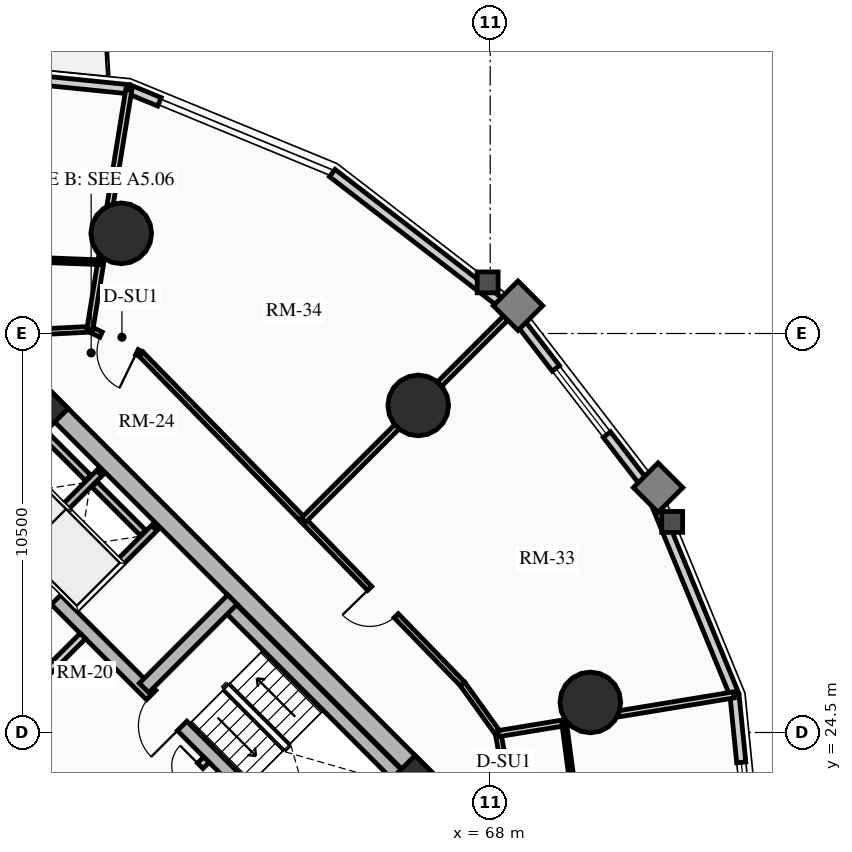
"""IFC4 building model, lengths in metres.
Left out: names, types, materials, properties, quantities, classifications, styles, units other than length and angle.
Written with IfcOpenShell. Run it as: python <this file> out.ifc"""

import sys

from ifc_helpers import new_model, si_unit, direction, frame, frame_2d, origin, origin_2d, place, context, subcontext, project, spatial, rectangle, circle, extrude, source, transform, mapped, element, fill, save


model = new_model("IFC4")
c1 = context("Model", 3, precision=1e-05, world=origin(), true_north=direction((0.0, 1.0)))
c2 = subcontext(c1, "Body", "Model", "MODEL_VIEW")
j1 = project(units=[si_unit("LENGTHUNIT", "METRE"), si_unit("PLANEANGLEUNIT", "RADIAN")], contexts=[c1])
p1 = place(None, origin())
s1 = spatial("IfcSite", under=j1, at=p1, CompositionType="ELEMENT")
p2 = place(p1, origin())
s2 = spatial("IfcBuilding", under=s1, at=p2, CompositionType="ELEMENT")
p3 = place(p2, frame((0.0, 0.0, 56.92)))
s3 = spatial("IfcBuildingStorey", under=s2, at=p3, CompositionType="ELEMENT", Elevation=56.92)
for number, where, z_axis, x_axis in (
    (1, (58.773, 15.661, 0.0), (0.0, 0.0, 1.0), (-0.707, 0.707, 0.0)),
    (2, (66.339, 23.227, 0.0), (0.0, 0.0, 1.0), (-0.707, 0.707, 0.0)),
):
    element("IfcWall", number, at=place(p3, frame(where, z_axis=z_axis, x_axis=x_axis)), inside=s3, PredefinedType="SHEAR", context=c2, shape_type="SweptSolid", body=[
        extrude(rectangle(XDim=14.3, YDim=0.5, at=frame_2d((7.15, 0.0))), origin(), (0.0, 0.0, 1.0), 2.91),
    ])
p4 = place(p3, frame((58.596, 15.838, 0.0), z_axis=(0.0, 0.0, 1.0), x_axis=(0.707106781187, 0.707106781187, 0.0)))
e3 = element("IfcWall", 3, at=p4, inside=s3, PredefinedType="SHEAR", context=c2, shape_type="SweptSolid", body=[
    extrude(rectangle(XDim=10.7, YDim=0.5, at=frame_2d((5.35, 0.0))), origin(), (0.0, 0.0, 1.0), 2.91),
])
m1 = source(origin(), c2, "Body", "SweptSolid", [
    extrude(rectangle(XDim=1.5, YDim=2.02, at=frame_2d((0.75, 1.01))), frame((0.0, 0.26, 0.0), z_axis=(0.0, -1.0, 0.0), x_axis=(1.0, 0.0, 0.0)), (0.0, 0.0, 1.0), 0.52),
])
p5 = place(p4, frame((5.45, 0.0, 0.0)))
e4 = element("IfcOpeningElement", 4, at=p5, cuts=e3, PredefinedType="OPENING", context=c2, shape_type="MappedRepresentation", body=[
    mapped(m1, transform((0.0, 0.0, 0.0), x_axis=(1.0, 0.0, 0.0), y_axis=(0.0, 1.0, 0.0), z_axis=(0.0, 0.0, 1.0), scale=1.0)),
])
p6 = place(p3, frame((48.838, 25.596, 0.0), z_axis=(0.0, 0.0, 1.0), x_axis=(0.707106781187, 0.707106781187, 0.0)))
e5 = element("IfcWall", 5, at=p6, inside=s3, PredefinedType="SHEAR", context=c2, shape_type="SweptSolid", body=[
    extrude(rectangle(XDim=10.7, YDim=0.5, at=frame_2d((5.35, 0.0))), origin(), (0.0, 0.0, 1.0), 2.91),
])
p7 = place(p6, frame((4.6, 0.0, 0.0)))
e6 = element("IfcOpeningElement", 6, at=p7, cuts=e5, PredefinedType="OPENING", context=c2, shape_type="MappedRepresentation", body=[
    mapped(m1, transform((0.0, 0.0, 0.0), x_axis=(1.0, 0.0, 0.0), y_axis=(0.0, 1.0, 0.0), z_axis=(0.0, 0.0, 1.0), scale=1.0)),
])
p8 = place(p3, frame((61.096, 18.338, 0.0), z_axis=(0.0, 0.0, 1.0), x_axis=(-0.707106781187, 0.707106781187, 0.0)))
e7 = element("IfcWall", 7, at=p8, inside=s3, PredefinedType="SHEAR", context=c2, shape_type="SweptSolid", body=[
    extrude(rectangle(XDim=13.8, YDim=0.35, at=frame_2d((6.9, 0.0))), origin(), (0.0, 0.0, 1.0), 2.91),
])
m2 = source(origin(), c2, "Body", "SweptSolid", [
    extrude(rectangle(XDim=1.1, YDim=2.015, at=frame_2d((0.55, 1.007))), frame((0.0, 0.185, 0.0), z_axis=(0.0, -1.0, 0.0), x_axis=(1.0, 0.0, 0.0)), (0.0, 0.0, 1.0), 0.37),
])
p9 = place(p8, frame((4.9, 0.0, 0.0)))
e8 = element("IfcOpeningElement", 8, at=p9, cuts=e7, PredefinedType="OPENING", context=c2, shape_type="MappedRepresentation", body=[
    mapped(m2, transform((0.0, 0.0, 0.0), x_axis=(1.0, 0.0, 0.0), y_axis=(0.0, 1.0, 0.0), z_axis=(0.0, 0.0, 1.0), scale=1.0)),
])
m3 = source(origin(), c2, "Body", "SweptSolid", [
    extrude(rectangle(XDim=1.15, YDim=2.02, at=frame_2d((0.575, 1.01))), frame((0.0, 0.185, 0.0), z_axis=(0.0, -1.0, 0.0), x_axis=(1.0, 0.0, 0.0)), (0.0, 0.0, 1.0), 0.37),
])
p10 = place(p8, frame((7.32, 0.0, 0.0)))
e9 = element("IfcOpeningElement", 9, at=p10, cuts=e7, PredefinedType="OPENING", context=c2, shape_type="MappedRepresentation", body=[
    mapped(m3, transform((0.0, 0.0, 0.0), x_axis=(1.0, 0.0, 0.0), y_axis=(0.0, 1.0, 0.0), z_axis=(0.0, 0.0, 1.0), scale=1.0)),
])
p11 = place(p3, frame((63.662, 20.904, 0.0), z_axis=(0.0, 0.0, 1.0), x_axis=(-0.707106781187, 0.707106781187, 0.0)))
e10 = element("IfcWall", 10, at=p11, inside=s3, PredefinedType="SHEAR", context=c2, shape_type="SweptSolid", body=[
    extrude(rectangle(XDim=13.8, YDim=0.35, at=frame_2d((6.9, 0.0))), origin(), (0.0, 0.0, 1.0), 2.91),
])
p12 = place(p11, frame((10.025, 0.0, 0.0)))
e11 = element("IfcOpeningElement", 11, at=p12, cuts=e10, PredefinedType="OPENING", context=c2, shape_type="MappedRepresentation", body=[
    mapped(m2, transform((0.0, 0.0, 0.0), x_axis=(1.0, 0.0, 0.0), y_axis=(0.0, 1.0, 0.0), z_axis=(0.0, 0.0, 1.0), scale=1.0)),
])
p13 = place(p11, frame((12.025, 0.0, 0.0)))
e12 = element("IfcOpeningElement", 12, at=p13, cuts=e10, PredefinedType="OPENING", context=c2, shape_type="MappedRepresentation", body=[
    mapped(m2, transform((0.0, 0.0, 0.0), x_axis=(1.0, 0.0, 0.0), y_axis=(0.0, 1.0, 0.0), z_axis=(0.0, 0.0, 1.0), scale=1.0)),
])
p14 = place(p11, frame((5.33, 0.0, 0.0)))
e13 = element("IfcOpeningElement", 13, at=p14, cuts=e10, PredefinedType="OPENING", context=c2, shape_type="MappedRepresentation", body=[
    mapped(m3, transform((0.0, 0.0, 0.0), x_axis=(1.0, 0.0, 0.0), y_axis=(0.0, 1.0, 0.0), z_axis=(0.0, 0.0, 1.0), scale=1.0)),
])
p15 = place(p3, frame((65.847, 23.089, 0.0), z_axis=(0.0, 0.0, 1.0), x_axis=(-0.707106781187, 0.707106781187, 0.0)))
e14 = element("IfcWall", 14, at=p15, inside=s3, PredefinedType="SHEAR", context=c2, shape_type="SweptSolid", body=[
    extrude(rectangle(XDim=6.745, YDim=0.35, at=frame_2d((3.373, 0.0))), origin(), (0.0, 0.0, 1.0), 2.91),
])
p16 = place(p3, frame((58.893, 25.674, 0.0), z_axis=(0.0, 0.0, 1.0), x_axis=(0.707106781187, 0.707106781187, 0.0)))
e15 = element("IfcWall", 15, at=p16, inside=s3, PredefinedType="SHEAR", context=c2, shape_type="SweptSolid", body=[
    extrude(rectangle(XDim=3.285, YDim=0.35, at=frame_2d((1.643, 0.0))), origin(), (0.0, 0.0, 1.0), 2.91),
])
for number, where, z_axis, x_axis in (
    (16, (66.024, 23.294, 0.0), (0.0, 0.0, 1.0), (0.707, 0.707, 0.0)),
    (17, (56.294, 33.024, 0.0), (0.0, 0.0, 1.0), (0.707, 0.707, 0.0)),
):
    element("IfcColumn", number, at=place(p3, frame(where, z_axis=z_axis, x_axis=x_axis)), inside=s3, PredefinedType="COLUMN", context=c2, shape_type="SweptSolid", body=[
        extrude(rectangle(XDim=0.85, YDim=0.85, at=origin_2d()), origin(), (0.0, 0.0, 1.0), 2.91),
    ])
for number, where, z_axis, x_axis in (
    (18, (66.107, 33.107, 0.0), (0.0, 0.0, 1.0), (1.0, 0.0, 0.0)),
    (19, (58.291, 37.635, 0.0), (0.0, 0.0, 1.0), (1.0, 0.0, 0.0)),
    (20, (70.635, 25.291, 0.0), (0.0, 0.0, 1.0), (1.0, 0.0, 0.0)),
):
    element("IfcColumn", number, at=place(p3, frame(where, z_axis=z_axis, x_axis=x_axis)), inside=s3, PredefinedType="USERDEFINED", context=c2, shape_type="SweptSolid", body=[
        extrude(circle(Radius=0.8, at=origin_2d()), origin(), (0.0, 0.0, 1.0), 2.91),
    ])
p17 = place(p3, frame((63.844, 39.222, 0.0), z_axis=(0.0, 0.0, 1.0), x_axis=(0.792014314407, -0.610502519057, 0.0)))
e21 = element("IfcWall", 21, at=p17, inside=s3, PredefinedType="SOLIDWALL", context=c2, shape_type="SweptSolid", body=[
    extrude(rectangle(XDim=5.973, YDim=0.24, at=frame_2d((2.987, 0.0))), origin(), (0.0, 0.0, 1.0), 2.073),
])
p18 = place(p3, frame((58.493, 41.428, 0.0), z_axis=(0.0, 0.0, 1.0), x_axis=(0.924556017656, -0.381046152345, 0.0)))
e22 = element("IfcWall", 22, at=p18, inside=s3, PredefinedType="SOLIDWALL", context=c2, shape_type="SweptSolid", body=[
    extrude(rectangle(XDim=0.87, YDim=0.24, at=frame_2d((0.435, 0.0))), origin(), (0.0, 0.0, 1.0), 2.073),
])
p19 = place(p3, frame((53.043, 41.976, 0.0), z_axis=(0.0, 0.0, 1.0), x_axis=(0.994970765694, -0.100165739718, 0.0)))
e23 = element("IfcWall", 23, at=p19, inside=s3, PredefinedType="SOLIDWALL", context=c2, shape_type="SweptSolid", body=[
    extrude(rectangle(XDim=5.477, YDim=0.24, at=frame_2d((2.738, 0.0))), origin(), (0.0, 0.0, 1.0), 2.073),
])
m4 = source(origin(), c2, "Body", "SweptSolid", [
    extrude(rectangle(XDim=1.15, YDim=2.005, at=frame_2d((0.575, 1.002))), frame((0.0, 0.13, 0.0), z_axis=(0.0, -1.0, 0.0), x_axis=(1.0, 0.0, 0.0)), (0.0, 0.0, 1.0), 0.26),
])
p20 = place(p19, frame((2.163, 0.0, 0.0)))
e24 = element("IfcOpeningElement", 24, at=p20, cuts=e23, PredefinedType="OPENING", context=c2, shape_type="MappedRepresentation", body=[
    mapped(m4, transform((0.0, 0.0, 0.0), x_axis=(1.0, 0.0, 0.0), y_axis=(0.0, 1.0, 0.0), z_axis=(0.0, 0.0, 1.0), scale=1.0)),
])
p21 = place(p3, frame((74.428, 25.493, 0.0), z_axis=(0.0, 0.0, 1.0), x_axis=(0.100165739718, -0.994970765694, 0.0)))
e25 = element("IfcWall", 25, at=p21, inside=s3, PredefinedType="SOLIDWALL", context=c2, shape_type="SweptSolid", body=[
    extrude(rectangle(XDim=5.477, YDim=0.24, at=frame_2d((2.738, 0.0))), origin(), (0.0, 0.0, 1.0), 2.073),
])
m5 = source(origin(), c2, "Body", "SweptSolid", [
    extrude(rectangle(XDim=1.9, YDim=1.35, at=frame_2d((0.95, 0.675))), frame((0.0, 0.13, 0.0), z_axis=(0.0, -1.0, 0.0), x_axis=(1.0, 0.0, 0.0)), (0.0, 0.0, 1.0), 0.26),
])
p22 = place(p21, frame((1.788, 0.0, 0.65)))
e26 = element("IfcOpeningElement", 26, at=p22, cuts=e25, PredefinedType="OPENING", context=c2, shape_type="MappedRepresentation", body=[
    mapped(m5, transform((0.0, 0.0, 0.0), x_axis=(1.0, 0.0, 0.0), y_axis=(0.0, 1.0, 0.0), z_axis=(0.0, 0.0, 1.0), scale=1.0)),
])
p23 = place(p3, frame((72.222, 30.844, 0.0), z_axis=(0.0, 0.0, 1.0), x_axis=(0.381027682565, -0.924563629567, 0.0)))
e27 = element("IfcWall", 27, at=p23, inside=s3, PredefinedType="SOLIDWALL", context=c2, shape_type="SweptSolid", body=[
    extrude(rectangle(XDim=5.789, YDim=0.24, at=frame_2d((2.894, 0.0))), origin(), (0.0, 0.0, 1.0), 2.073),
])
p24 = place(p3, frame((68.575, 35.575, 0.0), z_axis=(0.0, 0.0, 1.0), x_axis=(0.610502519057, -0.792014314407, 0.0)))
e28 = element("IfcWall", 28, at=p24, inside=s3, PredefinedType="SOLIDWALL", context=c2, shape_type="SweptSolid", body=[
    extrude(rectangle(XDim=5.973, YDim=0.24, at=frame_2d((2.987, 0.0))), origin(), (0.0, 0.0, 1.0), 2.073),
])
m6 = source(origin(), c2, "Body", "SweptSolid", [
    extrude(rectangle(XDim=2.2, YDim=1.35, at=frame_2d((1.1, 0.675))), frame((0.0, 0.13, 0.0), z_axis=(0.0, -1.0, 0.0), x_axis=(1.0, 0.0, 0.0)), (0.0, 0.0, 1.0), 0.26),
])
p25 = place(p24, frame((1.887, 0.0, 0.65)))
e29 = element("IfcOpeningElement", 29, at=p25, cuts=e28, PredefinedType="OPENING", context=c2, shape_type="MappedRepresentation", body=[
    mapped(m6, transform((0.0, 0.0, 0.0), x_axis=(1.0, 0.0, 0.0), y_axis=(0.0, 1.0, 0.0), z_axis=(0.0, 0.0, 1.0), scale=1.0)),
])
p26 = place(p3, frame((57.062, 27.781, 0.0), z_axis=(0.0, 0.0, 1.0), x_axis=(0.707106781187, 0.707106781187, 0.0)))
e30 = element("IfcWall", 30, at=p26, inside=s3, PredefinedType="SHEAR", context=c2, shape_type="SweptSolid", body=[
    extrude(rectangle(XDim=2.97, YDim=0.2, at=frame_2d((1.485, 0.0))), origin(), (0.0, 0.0, 1.0), 2.91),
])
p27 = place(p3, frame((55.615, 29.227, 0.0), z_axis=(0.0, 0.0, 1.0), x_axis=(0.707147878904, 0.70706568108, 0.0)))
e31 = element("IfcWall", 31, at=p27, inside=s3, PredefinedType="SHEAR", context=c2, shape_type="SweptSolid", body=[
    extrude(rectangle(XDim=2.97, YDim=0.2, at=frame_2d((1.485, 0.0))), origin(), (0.0, 0.0, 1.0), 2.91),
])
p28 = place(p3, frame((58.865, 29.754, 0.0), z_axis=(0.0, 0.0, 1.0), x_axis=(-0.707174411312, 0.707039144592, 0.0)))
e32 = element("IfcWall", 32, at=p28, inside=s3, PredefinedType="SHEAR", context=c2, shape_type="SweptSolid", body=[
    extrude(rectangle(XDim=1.805, YDim=0.2, at=frame_2d((0.902, 0.0))), origin(), (0.0, 0.0, 1.0), 2.91),
])
p29 = place(p3, frame((57.419, 31.2, 0.0), z_axis=(0.0, 0.0, 1.0), x_axis=(-0.707032117043, 0.707181437447, 0.0)))
e33 = element("IfcWall", 33, at=p29, inside=s3, PredefinedType="SHEAR", context=c2, shape_type="SweptSolid", body=[
    extrude(rectangle(XDim=1.635, YDim=0.2, at=frame_2d((0.817, 0.0))), origin(), (0.0, 0.0, 1.0), 2.91),
])
p30 = place(p3, frame((58.214, 21.467, 0.0), z_axis=(0.0, 0.0, 1.0), x_axis=(0.707106781187, 0.707106781187, 0.0)))
e34 = element("IfcWall", 34, at=p30, inside=s3, PredefinedType="PARTITIONING", context=c2, shape_type="SweptSolid", body=[
    extrude(rectangle(XDim=3.28, YDim=0.2, at=frame_2d((1.64, 0.0))), origin(), (0.0, 0.0, 1.0), 2.635),
])
m7 = source(origin(), c2, "Body", "SweptSolid", [
    extrude(rectangle(XDim=1.5, YDim=2.02, at=frame_2d((0.75, 1.01))), frame((0.0, 0.11, 0.0), z_axis=(0.0, -1.0, 0.0), x_axis=(1.0, 0.0, 0.0)), (0.0, 0.0, 1.0), 0.22),
])
p31 = place(p30, frame((1.55, 0.0, 0.0)))
e35 = element("IfcOpeningElement", 35, at=p31, cuts=e34, PredefinedType="OPENING", context=c2, shape_type="MappedRepresentation", body=[
    mapped(m7, transform((0.0, 0.0, 0.0), x_axis=(1.0, 0.0, 0.0), y_axis=(0.0, 1.0, 0.0), z_axis=(0.0, 0.0, 1.0), scale=1.0)),
])
p32 = place(p3, frame((54.961, 24.719, 0.0), z_axis=(0.0, 0.0, 1.0), x_axis=(0.707106781187, 0.707106781187, 0.0)))
e36 = element("IfcWall", 36, at=p32, inside=s3, PredefinedType="PARTITIONING", context=c2, shape_type="SweptSolid", body=[
    extrude(rectangle(XDim=3.28, YDim=0.2, at=frame_2d((1.64, 0.0))), origin(), (0.0, 0.0, 1.0), 2.635),
])
m8 = source(origin(), c2, "Body", "SweptSolid", [
    extrude(rectangle(XDim=0.9, YDim=2.005, at=frame_2d((0.45, 1.002))), frame((0.0, 0.11, 0.0), z_axis=(0.0, -1.0, 0.0), x_axis=(1.0, 0.0, 0.0)), (0.0, 0.0, 1.0), 0.22),
])
p33 = place(p32, frame((0.16, 0.0, 0.0)))
e37 = element("IfcOpeningElement", 37, at=p33, cuts=e36, PredefinedType="OPENING", context=c2, shape_type="MappedRepresentation", body=[
    mapped(m8, transform((0.0, 0.0, 0.0), x_axis=(1.0, 0.0, 0.0), y_axis=(0.0, 1.0, 0.0), z_axis=(0.0, 0.0, 1.0), scale=1.0)),
])
p34 = place(p3, frame((63.086, 30.086, 0.0), z_axis=(0.0, 0.0, 1.0), x_axis=(-0.699075897379, 0.715047473741, 0.0)))
e38 = element("IfcWall", 38, at=p34, inside=s3, PredefinedType="PARTITIONING", context=c2, shape_type="SweptSolid", body=[
    extrude(rectangle(XDim=6.114, YDim=0.15, at=frame_2d((3.057, 0.0))), origin(), (0.0, 0.0, 1.0), 2.159),
])
p35 = place(p3, frame((58.812, 34.458, 0.0), z_axis=(0.0, 0.0, 1.0), x_axis=(-0.899559490277, 0.436798264021, 0.0)))
e39 = element("IfcWall", 39, at=p35, inside=s3, PredefinedType="PARTITIONING", context=c2, shape_type="SweptSolid", body=[
    extrude(rectangle(XDim=1.495, YDim=0.15, at=frame_2d((0.748, 0.0))), origin(), (0.0, 0.0, 1.0), 2.205),
])
m9 = source(origin(), c2, "Body", "SweptSolid", [
    extrude(rectangle(XDim=1.05, YDim=2.015, at=frame_2d((0.525, 1.007))), frame((0.0, 0.085, 0.0), z_axis=(0.0, -1.0, 0.0), x_axis=(1.0, 0.0, 0.0)), (0.0, 0.0, 1.0), 0.17),
])
p36 = place(p35, frame((0.12, 0.0, 0.0)))
e40 = element("IfcOpeningElement", 40, at=p36, cuts=e39, PredefinedType="OPENING", context=c2, shape_type="MappedRepresentation", body=[
    mapped(m9, transform((0.0, 0.0, 0.0), x_axis=(1.0, 0.0, 0.0), y_axis=(0.0, 1.0, 0.0), z_axis=(0.0, 0.0, 1.0), scale=1.0)),
])
p37 = place(p3, frame((57.467, 35.111, 0.0), z_axis=(0.0, 0.0, 1.0), x_axis=(-0.998691757323, -0.051134859488, 0.0)))
e41 = element("IfcWall", 41, at=p37, inside=s3, PredefinedType="PARTITIONING", context=c2, shape_type="SweptSolid", body=[
    extrude(rectangle(XDim=1.485, YDim=0.15, at=frame_2d((0.742, 0.0))), origin(), (0.0, 0.0, 1.0), 2.159),
])
p38 = place(p3, frame((68.456, 23.11, 0.0), z_axis=(0.0, 0.0, 1.0), x_axis=(-0.1772522795, 0.984165448191, 0.0)))
e42 = element("IfcWall", 42, at=p38, inside=s3, PredefinedType="PARTITIONING", context=c2, shape_type="SweptSolid", body=[
    extrude(rectangle(XDim=1.382, YDim=0.15, at=frame_2d((0.691, 0.0))), origin(), (0.0, 0.0, 1.0), 2.159),
])
p39 = place(p3, frame((68.211, 24.469, 0.0), z_axis=(0.0, 0.0, 1.0), x_axis=(-0.583012141368, 0.812463441034, 0.0)))
e43 = element("IfcWall", 43, at=p39, inside=s3, PredefinedType="PARTITIONING", context=c2, shape_type="SweptSolid", body=[
    extrude(rectangle(XDim=1.613, YDim=0.15, at=frame_2d((0.807, 0.0))), origin(), (0.0, 0.0, 1.0), 2.205),
])
p40 = place(p3, frame((67.27, 25.78, 0.0), z_axis=(0.0, 0.0, 1.0), x_axis=(-0.696847842907, 0.717218992942, 0.0)))
e44 = element("IfcWall", 44, at=p40, inside=s3, PredefinedType="PARTITIONING", context=c2, shape_type="SweptSolid", body=[
    extrude(rectangle(XDim=6.004, YDim=0.15, at=frame_2d((3.002, 0.0))), origin(), (0.0, 0.0, 1.0), 2.635),
])
m10 = source(origin(), c2, "Body", "SweptSolid", [
    extrude(rectangle(XDim=1.0, YDim=2.015, at=frame_2d((0.5, 1.007))), frame((0.0, 0.085, 0.0), z_axis=(0.0, -1.0, 0.0), x_axis=(1.0, 0.0, 0.0)), (0.0, 0.0, 1.0), 0.17),
])
p41 = place(p40, frame((2.502, 0.0, 0.0)))
e45 = element("IfcOpeningElement", 45, at=p41, cuts=e44, PredefinedType="OPENING", context=c2, shape_type="MappedRepresentation", body=[
    mapped(m10, transform((0.0, 0.0, 0.0), x_axis=(1.0, 0.0, 0.0), y_axis=(0.0, 1.0, 0.0), z_axis=(0.0, 0.0, 1.0), scale=1.0)),
])
p42 = place(p3, frame((63.086, 30.086, 0.0), z_axis=(0.0, 0.0, 1.0), x_axis=(0.707106781187, 0.707106781187, 0.0)))
e46 = element("IfcWall", 46, at=p42, inside=s3, PredefinedType="PARTITIONING", context=c2, shape_type="SweptSolid", body=[
    extrude(rectangle(XDim=7.743, YDim=0.16, at=frame_2d((3.872, 0.0))), origin(), (0.0, 0.0, 1.0), 2.073),
])
p43 = place(p3, frame((57.467, 35.111, 0.0), z_axis=(0.0, 0.0, 1.0), x_axis=(0.160314040356, 0.987066060841, 0.0)))
e47 = element("IfcWall", 47, at=p43, inside=s3, PredefinedType="PARTITIONING", context=c2, shape_type="SweptSolid", body=[
    extrude(rectangle(XDim=6.379, YDim=0.16, at=frame_2d((3.19, 0.0))), origin(), (0.0, 0.0, 1.0), 2.073),
])
p44 = place(p3, frame((68.211, 24.469, 0.0), z_axis=(0.0, 0.0, 1.0), x_axis=(0.986718695255, 0.162438346562, 0.0)))
e48 = element("IfcWall", 48, at=p44, inside=s3, PredefinedType="PARTITIONING", context=c2, shape_type="SweptSolid", body=[
    extrude(rectangle(XDim=6.281, YDim=0.16, at=frame_2d((3.141, 0.0))), origin(), (0.0, 0.0, 1.0), 2.073),
])
p45 = place(p3, frame((57.753, 36.875, 0.0), z_axis=(0.0, 0.0, 1.0), x_axis=(-0.999273083568, 0.038122230487, 0.0)))
e49 = element("IfcWall", 49, at=p45, inside=s3, PredefinedType="PARTITIONING", context=c2, shape_type="SweptSolid", body=[
    extrude(rectangle(XDim=2.594, YDim=0.125, at=frame_2d((1.297, 0.0))), origin(), (0.0, 0.0, 1.0), 2.635),
])
p46 = place(p3, frame((70.276, 22.252, 0.0), z_axis=(0.0, 0.0, 1.0), x_axis=(-0.130649633398, 0.991428602217, 0.0)))
e50 = element("IfcWall", 50, at=p46, inside=s3, PredefinedType="PARTITIONING", context=c2, shape_type="SweptSolid", body=[
    extrude(rectangle(XDim=2.525, YDim=0.125, at=frame_2d((1.262, 0.0))), origin(), (0.0, 0.0, 1.0), 2.073),
])
m11 = source(origin(), c2, "Body", "SweptSolid", [
    extrude(rectangle(XDim=1.9, YDim=1.35, at=frame_2d((0.95, 0.675))), frame((0.0, 0.03, 0.0), z_axis=(0.0, -1.0, 0.0), x_axis=(1.0, 0.0, 0.0)), (0.0, 0.0, 1.0), 0.06),
])
p47 = place(p22, origin())
e51 = element("IfcWindow", 51, at=p47, inside=s3, PartitioningType="DOUBLE_PANEL_VERTICAL", PredefinedType="WINDOW", context=c2, shape_type="MappedRepresentation", body=[
    mapped(m11, transform((0.0, 0.0, 0.0), x_axis=(1.0, 0.0, 0.0), y_axis=(0.0, 1.0, 0.0), z_axis=(0.0, 0.0, 1.0), scale=1.0)),
])
fill(e26, e51)
m12 = source(origin(), c2, "Body", "SweptSolid", [
    extrude(rectangle(XDim=2.2, YDim=1.35, at=frame_2d((1.1, 0.675))), frame((0.0, 0.03, 0.0), z_axis=(0.0, -1.0, 0.0), x_axis=(1.0, 0.0, 0.0)), (0.0, 0.0, 1.0), 0.06),
])
p48 = place(p25, origin())
e52 = element("IfcWindow", 52, at=p48, inside=s3, PartitioningType="DOUBLE_PANEL_VERTICAL", PredefinedType="WINDOW", context=c2, shape_type="MappedRepresentation", body=[
    mapped(m12, transform((0.0, 0.0, 0.0), x_axis=(1.0, 0.0, 0.0), y_axis=(0.0, 1.0, 0.0), z_axis=(0.0, 0.0, 1.0), scale=1.0)),
])
fill(e29, e52)
m13 = source(origin(), c2, "Body", "SweptSolid", [
    extrude(rectangle(XDim=1.1, YDim=2.015, at=frame_2d((0.55, 1.007))), frame((0.0, 0.025, 0.0), z_axis=(0.0, -1.0, 0.0), x_axis=(1.0, 0.0, 0.0)), (0.0, 0.0, 1.0), 0.05),
])
p49 = place(p12, origin())
e53 = element("IfcDoor", 53, at=p49, inside=s3, OperationType="SLIDING_TO_RIGHT", PredefinedType="DOOR", context=c2, shape_type="MappedRepresentation", body=[
    mapped(m13, transform((0.0, 0.0, 0.0), x_axis=(1.0, 0.0, 0.0), y_axis=(0.0, 1.0, 0.0), z_axis=(0.0, 0.0, 1.0), scale=1.0)),
])
fill(e11, e53)
m14 = source(origin(), c2, "Body", "SweptSolid", [
    extrude(rectangle(XDim=1.15, YDim=2.02, at=frame_2d((0.575, 1.01))), frame((0.0, 0.025, 0.0), z_axis=(0.0, -1.0, 0.0), x_axis=(1.0, 0.0, 0.0)), (0.0, 0.0, 1.0), 0.05),
])
p50 = place(p14, origin())
e54 = element("IfcDoor", 54, at=p50, inside=s3, OperationType="SINGLE_SWING_LEFT", PredefinedType="DOOR", context=c2, shape_type="MappedRepresentation", body=[
    mapped(m14, transform((0.0, 0.0, 0.0), x_axis=(1.0, 0.0, 0.0), y_axis=(0.0, 1.0, 0.0), z_axis=(0.0, 0.0, 1.0), scale=1.0)),
])
fill(e13, e54)
m15 = source(origin(), c2, "Body", "SweptSolid", [
    extrude(rectangle(XDim=1.5, YDim=2.02, at=frame_2d((0.75, 1.01))), frame((0.0, 0.025, 0.0), z_axis=(0.0, -1.0, 0.0), x_axis=(1.0, 0.0, 0.0)), (0.0, 0.0, 1.0), 0.05),
])
p51 = place(p31, origin())
e55 = element("IfcDoor", 55, at=p51, inside=s3, OperationType="DOUBLE_DOOR_SINGLE_SWING", PredefinedType="DOOR", context=c2, shape_type="MappedRepresentation", body=[
    mapped(m15, transform((0.0, 0.0, 0.0), x_axis=(1.0, 0.0, 0.0), y_axis=(0.0, 1.0, 0.0), z_axis=(0.0, 0.0, 1.0), scale=1.0)),
])
fill(e35, e55)
m16 = source(origin(), c2, "Body", "SweptSolid", [
    extrude(rectangle(XDim=1.0, YDim=2.015, at=frame_2d((0.5, 1.007))), frame((0.0, 0.025, 0.0), z_axis=(0.0, -1.0, 0.0), x_axis=(1.0, 0.0, 0.0)), (0.0, 0.0, 1.0), 0.05),
])
p52 = place(p41, origin())
e56 = element("IfcDoor", 56, at=p52, inside=s3, OperationType="SINGLE_SWING_RIGHT", PredefinedType="DOOR", context=c2, shape_type="MappedRepresentation", body=[
    mapped(m16, transform((0.0, 0.0, 0.0), x_axis=(1.0, 0.0, 0.0), y_axis=(0.0, 1.0, 0.0), z_axis=(0.0, 0.0, 1.0), scale=1.0)),
])
fill(e45, e56)
m17 = source(origin(), c2, "Body", "SweptSolid", [
    extrude(rectangle(XDim=1.05, YDim=2.015, at=frame_2d((0.525, 1.007))), frame((0.0, 0.025, 0.0), z_axis=(0.0, -1.0, 0.0), x_axis=(1.0, 0.0, 0.0)), (0.0, 0.0, 1.0), 0.05),
])
p53 = place(p36, origin())
e57 = element("IfcDoor", 57, at=p53, inside=s3, OperationType="SINGLE_SWING_LEFT", PredefinedType="DOOR", context=c2, shape_type="MappedRepresentation", body=[
    mapped(m17, transform((0.0, 0.0, 0.0), x_axis=(1.0, 0.0, 0.0), y_axis=(0.0, 1.0, 0.0), z_axis=(0.0, 0.0, 1.0), scale=1.0)),
])
fill(e40, e57)
save(model, sys.argv[1])
